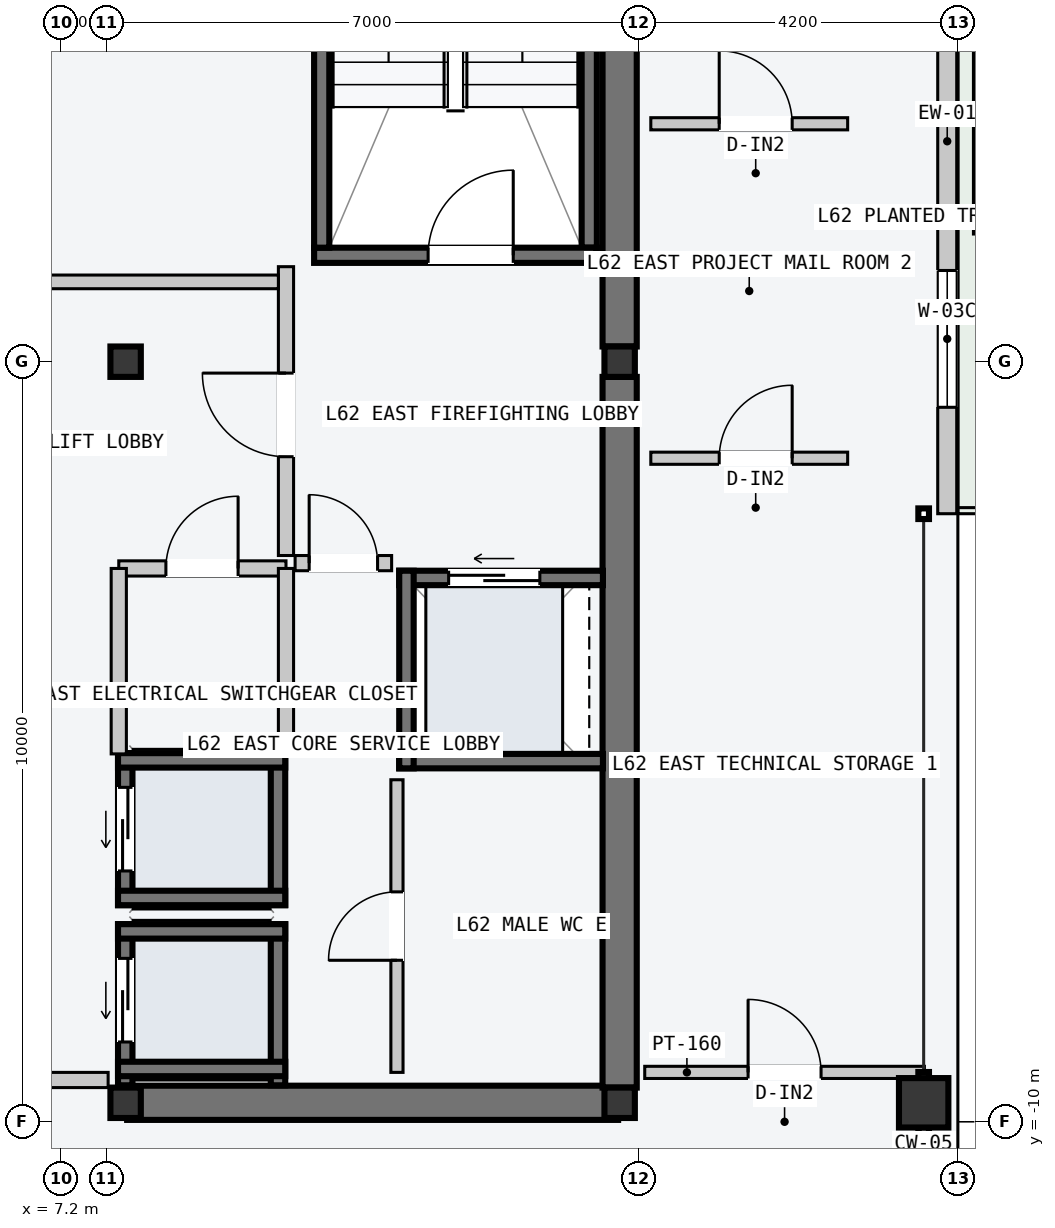
"""IFC4 building model, lengths in metres.
Left out: names, types, materials, properties, quantities, classifications, styles, units other than length and angle.
Written with IfcOpenShell. Run it as: python <this file> out.ifc"""

import sys

from ifc_helpers import new_model, si_unit, direction, frame, frame_2d, origin, origin_2d, place, context, subcontext, project, spatial, rectangle, hollow_rectangle, i_section, extrude, element, fill, save


model = new_model("IFC4")
c1 = context("Model", 3, precision=1e-05, world=origin(), true_north=direction((0.0, 1.0)))
c2 = subcontext(c1, "Body", "Model", "MODEL_VIEW")
j1 = project(units=[si_unit("LENGTHUNIT", "METRE"), si_unit("PLANEANGLEUNIT", "RADIAN")], contexts=[c1])
p1 = place(None, origin())
s1 = spatial("IfcSite", under=j1, at=p1, CompositionType="ELEMENT")
p2 = place(p1, origin())
s2 = spatial("IfcBuilding", under=s1, at=p2, CompositionType="ELEMENT")
p3 = place(p2, frame((0.0, 0.0, 236.4)))
s3 = spatial("IfcBuildingStorey", under=s2, at=p3, CompositionType="ELEMENT", Elevation=236.4)
p4 = place(p3, frame((8.07, -9.75, -0.2), z_axis=(0.0, 0.0, 1.0), x_axis=(1.0, 0.0, 0.0)))
e1 = element("IfcWall", 1, at=p4, inside=s3, PredefinedType="SHEAR", context=c2, shape_type="SweptSolid", body=[
    extrude(rectangle(XDim=6.46, YDim=0.45, at=frame_2d((3.23, 0.0))), origin(), (0.0, 0.0, 1.0), 3.6),
])
for number, where, z_axis, x_axis in (
    (2, (14.55, -9.55, -0.2), (0.0, 0.0, 1.0), (0.0, 1.0, 0.0)),
    (3, (14.55, 0.2, -0.2), (0.0, 0.0, 1.0), (0.0, 1.0, 0.0)),
):
    element("IfcWall", number, at=place(p3, frame(where, z_axis=z_axis, x_axis=x_axis)), inside=s3, PredefinedType="SHEAR", context=c2, shape_type="SweptSolid", body=[
        extrude(rectangle(XDim=9.35, YDim=0.45, at=frame_2d((4.675, 0.0))), origin(), (0.0, 0.0, 1.0), 3.6),
    ])
p5 = place(p3, frame((14.15, 1.5, -0.2), z_axis=(0.0, 0.0, 1.0), x_axis=(0.0, 1.0, 0.0)))
e4 = element("IfcWall", 4, at=p5, inside=s3, PredefinedType="SOLIDWALL", context=c2, shape_type="SweptSolid", body=[
    extrude(rectangle(XDim=7.8, YDim=0.2, at=frame_2d((3.9, 0.0))), origin(), (0.0, 0.0, 1.0), 3.6),
])
p6 = place(p3, frame((10.53, 1.4, -0.2), z_axis=(0.0, 0.0, 1.0), x_axis=(1.0, 0.0, 0.0)))
e5 = element("IfcWall", 5, at=p6, inside=s3, PredefinedType="SOLIDWALL", context=c2, shape_type="SweptSolid", body=[
    extrude(rectangle(XDim=3.72, YDim=0.2, at=frame_2d((1.86, 0.0))), origin(), (0.0, 0.0, 1.0), 3.6),
])
p7 = place(p6, frame((1.5, 0.0, 0.2)))
e6 = element("IfcOpeningElement", 6, at=p7, cuts=e5, PredefinedType="OPENING", context=c2, shape_type="SweptSolid", body=[
    extrude(rectangle(XDim=1.12, YDim=2.18, at=frame_2d((0.56, 1.09))), frame((0.0, 0.11, 0.0), z_axis=(0.0, -1.0, 0.0), x_axis=(1.0, 0.0, 0.0)), (0.0, 0.0, 1.0), 0.22),
])
p8 = place(p3, frame((10.63, 1.5, -0.2), z_axis=(0.0, 0.0, 1.0), x_axis=(0.0, 1.0, 0.0)))
e7 = element("IfcWall", 7, at=p8, inside=s3, PredefinedType="SOLIDWALL", context=c2, shape_type="SweptSolid", body=[
    extrude(rectangle(XDim=7.8, YDim=0.2, at=frame_2d((3.9, 0.0))), origin(), (0.0, 0.0, 1.0), 3.6),
])
for number, where, z_axis, x_axis in (
    (8, (8.05, -9.75, 0.0), (0.0, 0.0, 1.0), (1.0, 0.0, 0.0)),
    (9, (8.05, 0.0, 0.0), (0.0, 0.0, 1.0), (1.0, 0.0, 0.0)),
    (10, (14.55, -9.75, 0.0), (0.0, 0.0, 1.0), (1.0, 0.0, 0.0)),
    (11, (14.55, 0.0, 0.0), (0.0, 0.0, 1.0), (1.0, 0.0, 0.0)),
):
    element("IfcColumn", number, at=place(p3, frame(where, z_axis=z_axis, x_axis=x_axis)), inside=s3, PredefinedType="COLUMN", context=c2, shape_type="SweptSolid", body=[
        extrude(i_section(OverallWidth=0.4, OverallDepth=0.4, WebThickness=0.013, FlangeThickness=0.021, at=origin_2d()), origin(), (0.0, 0.0, 1.0), 3.6),
    ])
p9 = place(p3, frame((18.55, -9.75, 0.0), z_axis=(0.0, 0.0, 1.0), x_axis=(0.0, 1.0, 0.0)))
e12 = element("IfcColumn", 12, at=p9, inside=s3, PredefinedType="COLUMN", context=c2, shape_type="SweptSolid", body=[
    extrude(hollow_rectangle(XDim=0.65, YDim=0.65, WallThickness=0.028, at=origin_2d()), origin(), (0.0, 0.0, 1.0), 3.6),
])
p10 = place(p3, frame((18.86, -2.0, 0.0), z_axis=(0.0, 0.0, 1.0), x_axis=(0.0, 1.0, 0.0)))
e13 = element("IfcWall", 13, at=p10, inside=s3, PredefinedType="STANDARD", context=c2, shape_type="SweptSolid", body=[
    extrude(rectangle(XDim=10.8, YDim=0.25, at=frame_2d((5.4, 0.0))), origin(), (0.0, 0.0, 1.0), 3.4),
])
p11 = place(p10, frame((6.6, 0.0, 0.0)))
e14 = element("IfcOpeningElement", 14, at=p11, cuts=e13, PredefinedType="OPENING", context=c2, shape_type="SweptSolid", body=[
    extrude(rectangle(XDim=1.6, YDim=2.2, at=frame_2d((0.8, 1.1))), frame((0.0, 0.135, 0.0), z_axis=(0.0, -1.0, 0.0), x_axis=(1.0, 0.0, 0.0)), (0.0, 0.0, 1.0), 0.27),
])
p12 = place(p10, frame((1.4, 0.0, 0.85)))
e15 = element("IfcOpeningElement", 15, at=p12, cuts=e13, PredefinedType="OPENING", context=c2, shape_type="SweptSolid", body=[
    extrude(rectangle(XDim=1.8, YDim=2.05, at=frame_2d((0.9, 1.025))), frame((0.0, 0.135, 0.0), z_axis=(0.0, -1.0, 0.0), x_axis=(1.0, 0.0, 0.0)), (0.0, 0.0, 1.0), 0.27),
])
p13 = place(p3, frame((8.045, -9.52, -0.2), z_axis=(0.0, 0.0, 1.0), x_axis=(0.0, 1.0, 0.0)))
e16 = element("IfcWall", 16, at=p13, inside=s3, PredefinedType="SOLIDWALL", context=c2, shape_type="SweptSolid", body=[
    extrude(rectangle(XDim=2.12, YDim=0.19, at=frame_2d((1.06, 0.0))), origin(), (0.0, 0.0, 1.0), 3.6),
])
p14 = place(p13, frame((0.57, 0.0, 0.2)))
e17 = element("IfcOpeningElement", 17, at=p14, cuts=e16, PredefinedType="OPENING", context=c2, shape_type="SweptSolid", body=[
    extrude(rectangle(XDim=1.1, YDim=2.2, at=frame_2d((0.55, 1.1))), frame((0.0, 0.105, 0.0), z_axis=(0.0, -1.0, 0.0), x_axis=(1.0, 0.0, 0.0)), (0.0, 0.0, 1.0), 0.21),
])
p15 = place(p3, frame((10.055, -9.52, -0.2), z_axis=(0.0, 0.0, 1.0), x_axis=(0.0, 1.0, 0.0)))
e18 = element("IfcWall", 18, at=p15, inside=s3, PredefinedType="SOLIDWALL", context=c2, shape_type="SweptSolid", body=[
    extrude(rectangle(XDim=2.12, YDim=0.19, at=frame_2d((1.06, 0.0))), origin(), (0.0, 0.0, 1.0), 3.6),
])
for number, where, z_axis, x_axis in (
    (19, (7.95, -7.495, -0.2), (0.0, 0.0, 1.0), (1.0, 0.0, 0.0)),
    (20, (7.95, -9.305, -0.2), (0.0, 0.0, 1.0), (1.0, 0.0, 0.0)),
):
    element("IfcWall", number, at=place(p3, frame(where, z_axis=z_axis, x_axis=x_axis)), inside=s3, PredefinedType="SOLIDWALL", context=c2, shape_type="SweptSolid", body=[
        extrude(rectangle(XDim=2.2, YDim=0.19, at=frame_2d((1.1, 0.0))), origin(), (0.0, 0.0, 1.0), 3.6),
    ])
p16 = place(p3, frame((8.045, -7.15, -0.2), z_axis=(0.0, 0.0, 1.0), x_axis=(0.0, 1.0, 0.0)))
e21 = element("IfcWall", 21, at=p16, inside=s3, PredefinedType="SOLIDWALL", context=c2, shape_type="SweptSolid", body=[
    extrude(rectangle(XDim=2.0, YDim=0.19, at=frame_2d((1.0, 0.0))), origin(), (0.0, 0.0, 1.0), 3.6),
])
p17 = place(p16, frame((0.45, 0.0, 0.2)))
e22 = element("IfcOpeningElement", 22, at=p17, cuts=e21, PredefinedType="OPENING", context=c2, shape_type="SweptSolid", body=[
    extrude(rectangle(XDim=1.1, YDim=2.2, at=frame_2d((0.55, 1.1))), frame((0.0, 0.105, 0.0), z_axis=(0.0, -1.0, 0.0), x_axis=(1.0, 0.0, 0.0)), (0.0, 0.0, 1.0), 0.21),
])
p18 = place(p3, frame((10.055, -7.15, -0.2), z_axis=(0.0, 0.0, 1.0), x_axis=(0.0, 1.0, 0.0)))
e23 = element("IfcWall", 23, at=p18, inside=s3, PredefinedType="SOLIDWALL", context=c2, shape_type="SweptSolid", body=[
    extrude(rectangle(XDim=2.0, YDim=0.19, at=frame_2d((1.0, 0.0))), origin(), (0.0, 0.0, 1.0), 3.6),
])
for number, where, z_axis, x_axis in (
    (24, (7.95, -5.245, -0.2), (0.0, 0.0, 1.0), (1.0, 0.0, 0.0)),
    (25, (7.95, -7.055, -0.2), (0.0, 0.0, 1.0), (1.0, 0.0, 0.0)),
):
    element("IfcWall", number, at=place(p3, frame(where, z_axis=z_axis, x_axis=x_axis)), inside=s3, PredefinedType="SOLIDWALL", context=c2, shape_type="SweptSolid", body=[
        extrude(rectangle(XDim=2.2, YDim=0.19, at=frame_2d((1.1, 0.0))), origin(), (0.0, 0.0, 1.0), 3.6),
    ])
p19 = place(p3, frame((11.65, -2.845, -0.2), z_axis=(0.0, 0.0, 1.0), x_axis=(1.0, 0.0, 0.0)))
e26 = element("IfcWall", 26, at=p19, inside=s3, PredefinedType="SOLIDWALL", context=c2, shape_type="SweptSolid", body=[
    extrude(rectangle(XDim=2.68, YDim=0.19, at=frame_2d((1.34, 0.0))), origin(), (0.0, 0.0, 1.0), 3.6),
])
p20 = place(p19, frame((0.65, 0.0, 0.2)))
e27 = element("IfcOpeningElement", 27, at=p20, cuts=e26, PredefinedType="OPENING", context=c2, shape_type="SweptSolid", body=[
    extrude(rectangle(XDim=1.2, YDim=2.2, at=frame_2d((0.6, 1.1))), frame((0.0, 0.105, 0.0), z_axis=(0.0, -1.0, 0.0), x_axis=(1.0, 0.0, 0.0)), (0.0, 0.0, 1.0), 0.21),
])
p21 = place(p3, frame((11.65, -5.255, -0.2), z_axis=(0.0, 0.0, 1.0), x_axis=(1.0, 0.0, 0.0)))
e28 = element("IfcWall", 28, at=p21, inside=s3, PredefinedType="SOLIDWALL", context=c2, shape_type="SweptSolid", body=[
    extrude(rectangle(XDim=2.68, YDim=0.19, at=frame_2d((1.34, 0.0))), origin(), (0.0, 0.0, 1.0), 3.6),
])
p22 = place(p3, frame((11.745, -5.35, -0.2), z_axis=(0.0, 0.0, 1.0), x_axis=(0.0, 1.0, 0.0)))
e29 = element("IfcWall", 29, at=p22, inside=s3, PredefinedType="SOLIDWALL", context=c2, shape_type="SweptSolid", body=[
    extrude(rectangle(XDim=2.6, YDim=0.19, at=frame_2d((1.3, 0.0))), origin(), (0.0, 0.0, 1.0), 3.6),
])
p23 = place(p3, frame((6.02, -9.45, 0.0), z_axis=(0.0, 0.0, 1.0), x_axis=(1.0, 0.0, 0.0)))
e30 = element("IfcWall", 30, at=p23, inside=s3, PredefinedType="PARTITIONING", context=c2, shape_type="SweptSolid", body=[
    extrude(rectangle(XDim=1.8, YDim=0.2, at=frame_2d((0.9, 0.0))), origin(), (0.0, 0.0, 1.0), 3.4),
])
p24 = place(p3, frame((10.16, -2.55, 0.0), z_axis=(0.0, 0.0, 1.0), x_axis=(0.0, 1.0, 0.0)))
e31 = element("IfcWall", 31, at=p24, inside=s3, PredefinedType="PARTITIONING", context=c2, shape_type="SweptSolid", body=[
    extrude(rectangle(XDim=3.8, YDim=0.2, at=frame_2d((1.9, 0.0))), origin(), (0.0, 0.0, 1.0), 3.4),
])
p25 = place(p24, frame((1.3, 0.0, 0.0)))
e32 = element("IfcOpeningElement", 32, at=p25, cuts=e31, PredefinedType="OPENING", context=c2, shape_type="SweptSolid", body=[
    extrude(rectangle(XDim=1.1, YDim=2.15, at=frame_2d((0.55, 1.075))), frame((0.0, 0.11, 0.0), z_axis=(0.0, -1.0, 0.0), x_axis=(1.0, 0.0, 0.0)), (0.0, 0.0, 1.0), 0.22),
])
p26 = place(p3, frame((10.28, -2.65, 0.0), z_axis=(0.0, 0.0, 1.0), x_axis=(1.0, 0.0, 0.0)))
e33 = element("IfcWall", 33, at=p26, inside=s3, PredefinedType="PARTITIONING", context=c2, shape_type="SweptSolid", body=[
    extrude(rectangle(XDim=1.27, YDim=0.2, at=frame_2d((0.635, 0.0))), origin(), (0.0, 0.0, 1.0), 3.4),
])
p27 = place(p26, frame((0.185, 0.0, 0.0)))
e34 = element("IfcOpeningElement", 34, at=p27, cuts=e33, PredefinedType="OPENING", context=c2, shape_type="SweptSolid", body=[
    extrude(rectangle(XDim=0.9, YDim=2.15, at=frame_2d((0.45, 1.075))), frame((0.0, 0.11, 0.0), z_axis=(0.0, -1.0, 0.0), x_axis=(1.0, 0.0, 0.0)), (0.0, 0.0, 1.0), 0.22),
])
p28 = place(p3, frame((7.96, -2.72, 0.0), z_axis=(0.0, 0.0, 1.0), x_axis=(1.0, 0.0, 0.0)))
e35 = element("IfcWall", 35, at=p28, inside=s3, PredefinedType="PARTITIONING", context=c2, shape_type="SweptSolid", body=[
    extrude(rectangle(XDim=2.2, YDim=0.2, at=frame_2d((1.1, 0.0))), origin(), (0.0, 0.0, 1.0), 3.4),
])
p29 = place(p28, frame((0.62, 0.0, 0.0)))
e36 = element("IfcOpeningElement", 36, at=p29, cuts=e35, PredefinedType="OPENING", context=c2, shape_type="SweptSolid", body=[
    extrude(rectangle(XDim=0.95, YDim=2.1, at=frame_2d((0.475, 1.05))), frame((0.0, 0.11, 0.0), z_axis=(0.0, -1.0, 0.0), x_axis=(1.0, 0.0, 0.0)), (0.0, 0.0, 1.0), 0.22),
])
for number, where, z_axis, x_axis in (
    (37, (7.96, -5.16, 0.0), (0.0, 0.0, 1.0), (0.0, 1.0, 0.0)),
    (38, (10.16, -5.16, 0.0), (0.0, 0.0, 1.0), (0.0, 1.0, 0.0)),
):
    element("IfcWall", number, at=place(p3, frame(where, z_axis=z_axis, x_axis=x_axis)), inside=s3, PredefinedType="PARTITIONING", context=c2, shape_type="SweptSolid", body=[
        extrude(rectangle(XDim=2.44, YDim=0.2, at=frame_2d((1.22, 0.0))), origin(), (0.0, 0.0, 1.0), 3.4),
    ])
p30 = place(p3, frame((11.62, -9.35, 0.0), z_axis=(0.0, 0.0, 1.0), x_axis=(0.0, 1.0, 0.0)))
e39 = element("IfcWall", 39, at=p30, inside=s3, PredefinedType="PARTITIONING", context=c2, shape_type="SweptSolid", body=[
    extrude(rectangle(XDim=3.85, YDim=0.16, at=frame_2d((1.925, 0.0))), origin(), (0.0, 0.0, 1.0), 3.4),
])
p31 = place(p30, frame((1.475, 0.0, 0.0)))
e40 = element("IfcOpeningElement", 40, at=p31, cuts=e39, PredefinedType="OPENING", context=c2, shape_type="SweptSolid", body=[
    extrude(rectangle(XDim=0.9, YDim=2.15, at=frame_2d((0.45, 1.075))), frame((0.0, 0.09, 0.0), z_axis=(0.0, -1.0, 0.0), x_axis=(1.0, 0.0, 0.0)), (0.0, 0.0, 1.0), 0.18),
])
p32 = place(p3, frame((-0.49, 1.05, 0.0), z_axis=(0.0, 0.0, 1.0), x_axis=(1.0, 0.0, 0.0)))
e41 = element("IfcWall", 41, at=p32, inside=s3, PredefinedType="PARTITIONING", context=c2, shape_type="SweptSolid", body=[
    extrude(rectangle(XDim=10.55, YDim=0.18, at=frame_2d((5.275, 0.0))), origin(), (0.0, 0.0, 1.0), 3.4),
])
p33 = place(p3, frame((14.88, -9.35, 0.0), z_axis=(0.0, 0.0, 1.0), x_axis=(1.0, 0.0, 0.0)))
e42 = element("IfcWall", 42, at=p33, inside=s3, PredefinedType="PARTITIONING", context=c2, shape_type="SweptSolid", body=[
    extrude(rectangle(XDim=3.68, YDim=0.16, at=frame_2d((1.84, 0.0))), origin(), (0.0, 0.0, 1.0), 3.4),
])
p34 = place(p33, frame((1.36, 0.0, 0.0)))
e43 = element("IfcOpeningElement", 43, at=p34, cuts=e42, PredefinedType="OPENING", context=c2, shape_type="SweptSolid", body=[
    extrude(rectangle(XDim=0.96, YDim=2.18, at=frame_2d((0.48, 1.09))), frame((0.0, 0.09, 0.0), z_axis=(0.0, -1.0, 0.0), x_axis=(1.0, 0.0, 0.0)), (0.0, 0.0, 1.0), 0.18),
])
p35 = place(p3, frame((14.96, -1.27, 0.0), z_axis=(0.0, 0.0, 1.0), x_axis=(1.0, 0.0, 0.0)))
e44 = element("IfcWall", 44, at=p35, inside=s3, PredefinedType="PARTITIONING", context=c2, shape_type="SweptSolid", body=[
    extrude(rectangle(XDim=2.59, YDim=0.16, at=frame_2d((1.295, 0.0))), origin(), (0.0, 0.0, 1.0), 3.4),
])
p36 = place(p35, frame((0.9, 0.0, 0.0)))
e45 = element("IfcOpeningElement", 45, at=p36, cuts=e44, PredefinedType="OPENING", context=c2, shape_type="SweptSolid", body=[
    extrude(rectangle(XDim=0.96, YDim=2.18, at=frame_2d((0.48, 1.09))), frame((0.0, 0.09, 0.0), z_axis=(0.0, -1.0, 0.0), x_axis=(1.0, 0.0, 0.0)), (0.0, 0.0, 1.0), 0.18),
])
p37 = place(p3, frame((14.96, 3.13, 0.0), z_axis=(0.0, 0.0, 1.0), x_axis=(1.0, 0.0, 0.0)))
e46 = element("IfcWall", 46, at=p37, inside=s3, PredefinedType="PARTITIONING", context=c2, shape_type="SweptSolid", body=[
    extrude(rectangle(XDim=2.59, YDim=0.16, at=frame_2d((1.295, 0.0))), origin(), (0.0, 0.0, 1.0), 3.4),
])
p38 = place(p37, frame((0.9, 0.0, 0.0)))
e47 = element("IfcOpeningElement", 47, at=p38, cuts=e46, PredefinedType="OPENING", context=c2, shape_type="SweptSolid", body=[
    extrude(rectangle(XDim=0.96, YDim=2.18, at=frame_2d((0.48, 1.09))), frame((0.0, 0.09, 0.0), z_axis=(0.0, -1.0, 0.0), x_axis=(1.0, 0.0, 0.0)), (0.0, 0.0, 1.0), 0.18),
])
p39 = place(p7, origin())
e48 = element("IfcDoor", 48, at=p39, inside=s3, OperationType="SINGLE_SWING_RIGHT", PredefinedType="DOOR", context=c2, shape_type="SweptSolid", body=[
    extrude(rectangle(XDim=1.12, YDim=2.18, at=frame_2d((0.56, 1.09))), frame((0.0, 0.025, 0.0), z_axis=(0.0, -1.0, 0.0), x_axis=(1.0, 0.0, 0.0)), (0.0, 0.0, 1.0), 0.05),
])
fill(e6, e48)
p40 = place(p12, origin())
e49 = element("IfcWindow", 49, at=p40, inside=s3, PartitioningType="SINGLE_PANEL", PredefinedType="WINDOW", context=c2, shape_type="SweptSolid", body=[
    extrude(rectangle(XDim=1.8, YDim=2.05, at=frame_2d((0.9, 1.025))), frame((0.0, 0.03, 0.0), z_axis=(0.0, -1.0, 0.0), x_axis=(1.0, 0.0, 0.0)), (0.0, 0.0, 1.0), 0.06),
])
fill(e15, e49)
p41 = place(p14, origin())
e50 = element("IfcDoor", 50, at=p41, inside=s3, OperationType="SLIDING_TO_LEFT", PredefinedType="DOOR", context=c2, shape_type="SweptSolid", body=[
    extrude(rectangle(XDim=1.1, YDim=2.2, at=frame_2d((0.55, 1.1))), frame((0.0, 0.025, 0.0), z_axis=(0.0, -1.0, 0.0), x_axis=(1.0, 0.0, 0.0)), (0.0, 0.0, 1.0), 0.05),
])
fill(e17, e50)
p42 = place(p17, origin())
e51 = element("IfcDoor", 51, at=p42, inside=s3, OperationType="SLIDING_TO_LEFT", PredefinedType="DOOR", context=c2, shape_type="SweptSolid", body=[
    extrude(rectangle(XDim=1.1, YDim=2.2, at=frame_2d((0.55, 1.1))), frame((0.0, 0.025, 0.0), z_axis=(0.0, -1.0, 0.0), x_axis=(1.0, 0.0, 0.0)), (0.0, 0.0, 1.0), 0.05),
])
fill(e22, e51)
p43 = place(p20, origin())
e52 = element("IfcDoor", 52, at=p43, inside=s3, OperationType="SLIDING_TO_LEFT", PredefinedType="DOOR", context=c2, shape_type="SweptSolid", body=[
    extrude(rectangle(XDim=1.2, YDim=2.2, at=frame_2d((0.6, 1.1))), frame((0.0, 0.025, 0.0), z_axis=(0.0, -1.0, 0.0), x_axis=(1.0, 0.0, 0.0)), (0.0, 0.0, 1.0), 0.05),
])
fill(e27, e52)
p44 = place(p25, origin())
e53 = element("IfcDoor", 53, at=p44, inside=s3, OperationType="SINGLE_SWING_RIGHT", PredefinedType="DOOR", context=c2, shape_type="SweptSolid", body=[
    extrude(rectangle(XDim=1.1, YDim=2.15, at=frame_2d((0.55, 1.075))), frame((0.0, 0.025, 0.0), z_axis=(0.0, -1.0, 0.0), x_axis=(1.0, 0.0, 0.0)), (0.0, 0.0, 1.0), 0.05),
])
fill(e32, e53)
p45 = place(p27, origin())
e54 = element("IfcDoor", 54, at=p45, inside=s3, OperationType="SINGLE_SWING_LEFT", PredefinedType="DOOR", context=c2, shape_type="SweptSolid", body=[
    extrude(rectangle(XDim=0.9, YDim=2.15, at=frame_2d((0.45, 1.075))), frame((0.0, 0.025, 0.0), z_axis=(0.0, -1.0, 0.0), x_axis=(1.0, 0.0, 0.0)), (0.0, 0.0, 1.0), 0.05),
])
fill(e34, e54)
p46 = place(p29, origin())
e55 = element("IfcDoor", 55, at=p46, inside=s3, OperationType="SINGLE_SWING_RIGHT", PredefinedType="DOOR", context=c2, shape_type="SweptSolid", body=[
    extrude(rectangle(XDim=0.95, YDim=2.1, at=frame_2d((0.475, 1.05))), frame((0.0, 0.025, 0.0), z_axis=(0.0, -1.0, 0.0), x_axis=(1.0, 0.0, 0.0)), (0.0, 0.0, 1.0), 0.05),
])
fill(e36, e55)
p47 = place(p31, origin())
e56 = element("IfcDoor", 56, at=p47, inside=s3, OperationType="SINGLE_SWING_LEFT", PredefinedType="DOOR", context=c2, shape_type="SweptSolid", body=[
    extrude(rectangle(XDim=0.9, YDim=2.15, at=frame_2d((0.45, 1.075))), frame((0.0, 0.025, 0.0), z_axis=(0.0, -1.0, 0.0), x_axis=(1.0, 0.0, 0.0)), (0.0, 0.0, 1.0), 0.05),
])
fill(e40, e56)
p48 = place(p34, origin())
e57 = element("IfcDoor", 57, at=p48, inside=s3, OperationType="SINGLE_SWING_LEFT", PredefinedType="DOOR", context=c2, shape_type="SweptSolid", body=[
    extrude(rectangle(XDim=0.96, YDim=2.18, at=frame_2d((0.48, 1.09))), frame((0.0, 0.025, 0.0), z_axis=(0.0, -1.0, 0.0), x_axis=(1.0, 0.0, 0.0)), (0.0, 0.0, 1.0), 0.05),
])
fill(e43, e57)
p49 = place(p36, origin())
e58 = element("IfcDoor", 58, at=p49, inside=s3, OperationType="SINGLE_SWING_RIGHT", PredefinedType="DOOR", context=c2, shape_type="SweptSolid", body=[
    extrude(rectangle(XDim=0.96, YDim=2.18, at=frame_2d((0.48, 1.09))), frame((0.0, 0.025, 0.0), z_axis=(0.0, -1.0, 0.0), x_axis=(1.0, 0.0, 0.0)), (0.0, 0.0, 1.0), 0.05),
])
fill(e45, e58)
p50 = place(p38, origin())
e59 = element("IfcDoor", 59, at=p50, inside=s3, OperationType="SINGLE_SWING_LEFT", PredefinedType="DOOR", context=c2, shape_type="SweptSolid", body=[
    extrude(rectangle(XDim=0.96, YDim=2.18, at=frame_2d((0.48, 1.09))), frame((0.0, 0.025, 0.0), z_axis=(0.0, -1.0, 0.0), x_axis=(1.0, 0.0, 0.0)), (0.0, 0.0, 1.0), 0.05),
])
fill(e47, e59)
save(model, sys.argv[1])
